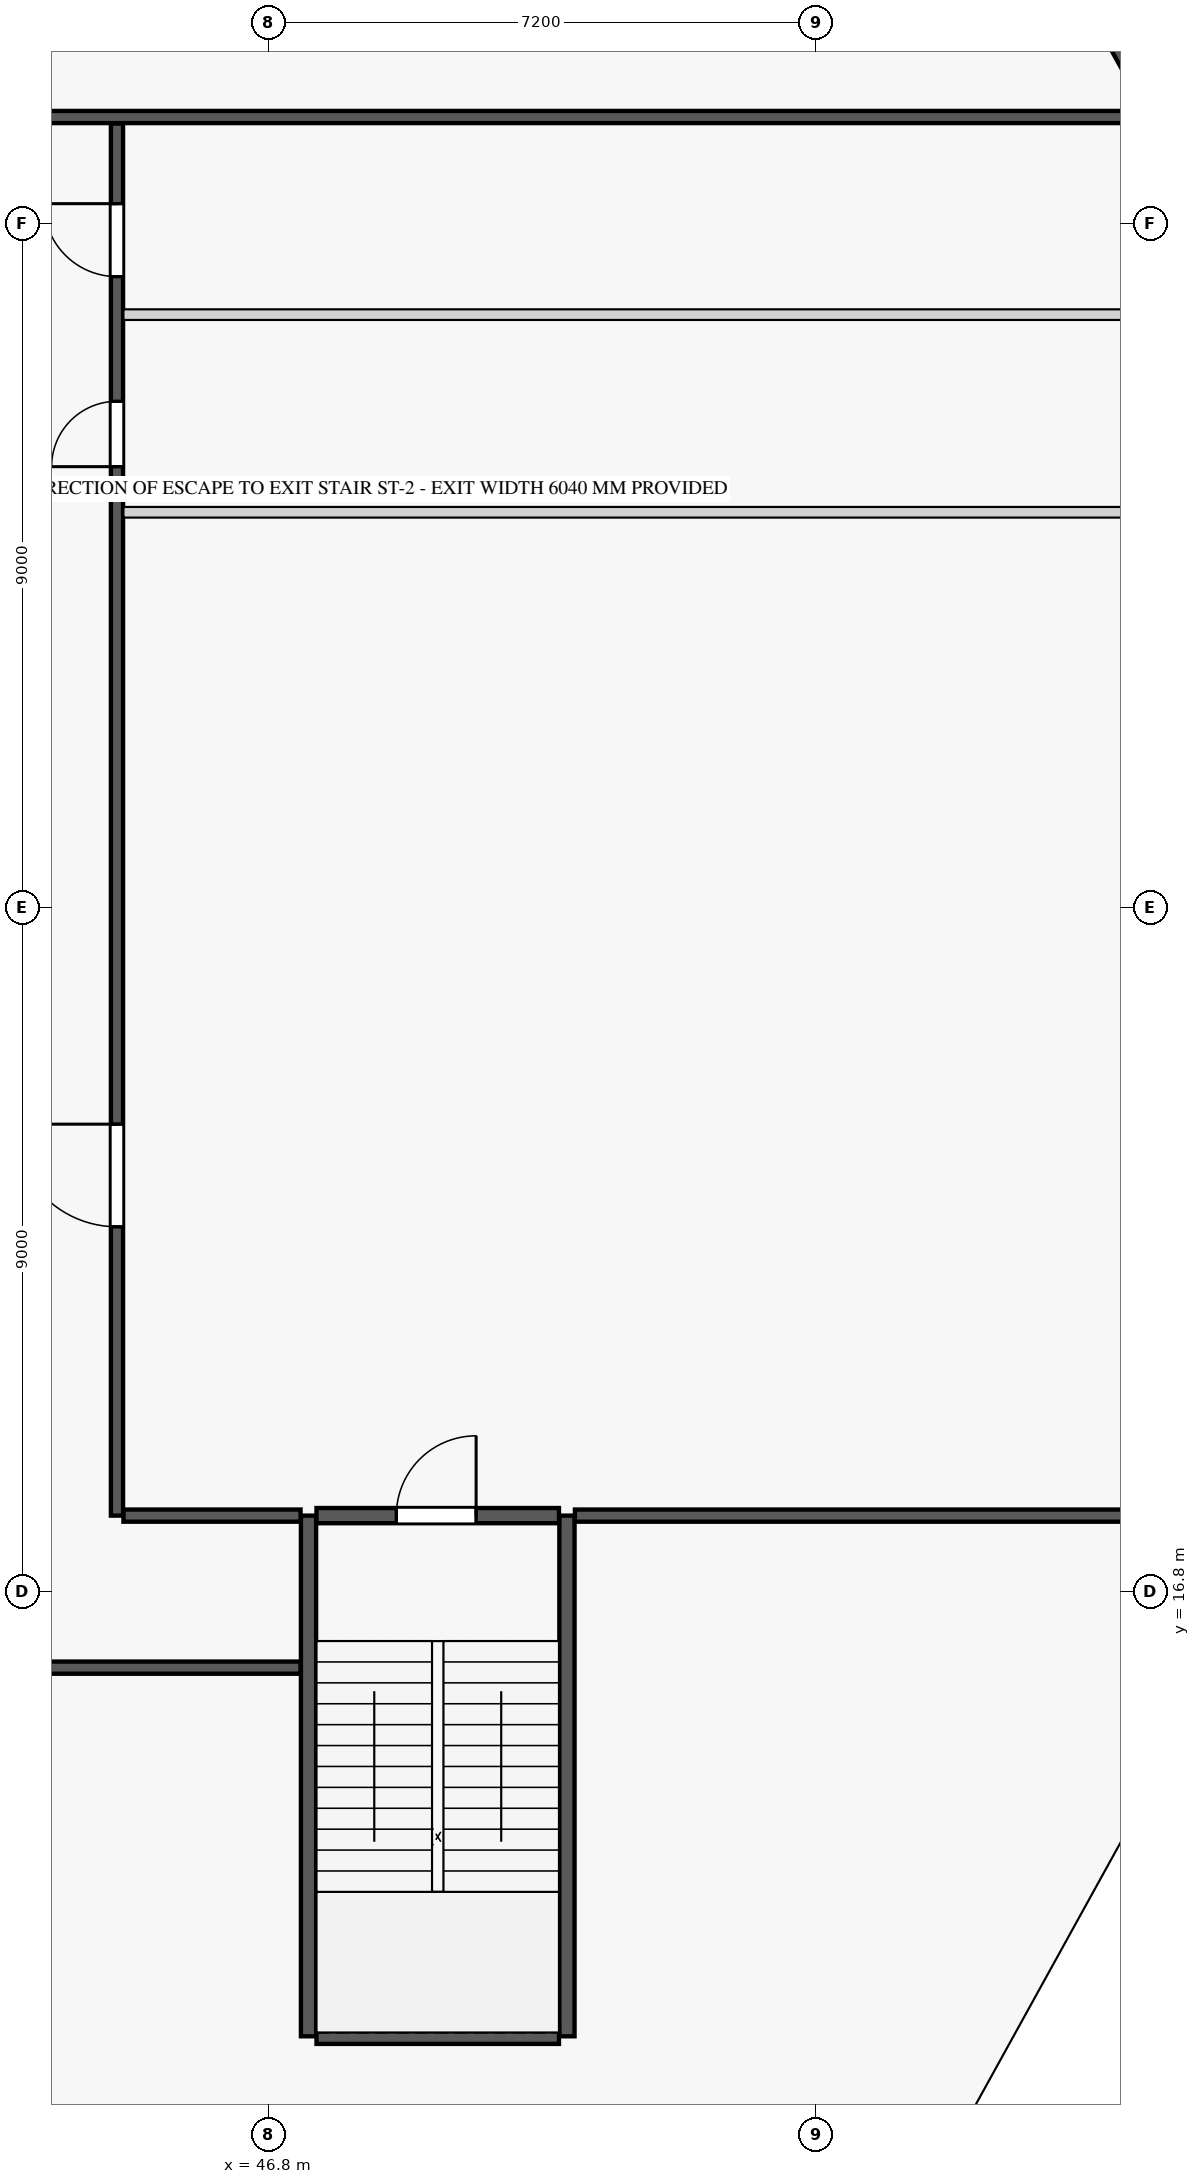
"""IFC4 building model, lengths in metres.
Left out: names, types, materials, properties, quantities, classifications, styles, units other than length and angle.
Written with IfcOpenShell. Run it as: python <this file> out.ifc"""

import sys

from ifc_helpers import new_model, si_unit, direction, frame, frame_2d, origin, place, context, subcontext, project, spatial, rectangle, extrude, element, fill, save


model = new_model("IFC4")
c1 = context("Model", 3, precision=1e-05, world=origin(), true_north=direction((0.0, 1.0)))
c2 = subcontext(c1, "Body", "Model", "MODEL_VIEW")
j1 = project(units=[si_unit("LENGTHUNIT", "METRE"), si_unit("PLANEANGLEUNIT", "RADIAN")], contexts=[c1])
p1 = place(None, origin())
s1 = spatial("IfcSite", under=j1, at=p1, CompositionType="ELEMENT")
p2 = place(p1, origin())
s2 = spatial("IfcBuilding", under=s1, at=p2, CompositionType="ELEMENT")
p3 = place(p2, frame((0.0, 0.0, 10.5)))
s3 = spatial("IfcBuildingStorey", under=s2, at=p3, CompositionType="ELEMENT", Elevation=10.5)
for number, where, z_axis, x_axis in (
    (1, (47.32, 10.95, 0.0), (0.0, 0.0, 1.0), (0.0, 1.0, 0.0)),
    (2, (50.72, 10.95, 0.0), (0.0, 0.0, 1.0), (0.0, 1.0, 0.0)),
):
    element("IfcWall", number, at=place(p3, frame(where, z_axis=z_axis, x_axis=x_axis)), inside=s3, PredefinedType="SHEAR", context=c2, shape_type="SweptSolid", body=[
        extrude(rectangle(XDim=6.85, YDim=0.2, at=frame_2d((3.425, 0.0))), origin(), (0.0, 0.0, 1.0), 4.5),
    ])
p4 = place(p3, frame((47.425, 10.95, 0.0), z_axis=(0.0, 0.0, 1.0), x_axis=(1.0, 0.0, 0.0)))
e3 = element("IfcWall", 3, at=p4, inside=s3, PredefinedType="PLUMBINGWALL", context=c2, shape_type="SweptSolid", body=[
    extrude(rectangle(XDim=3.19, YDim=0.2, at=frame_2d((1.595, 0.0))), origin(), (0.0, 0.0, 1.0), 4.25),
])
p5 = place(p3, frame((47.425, 17.8, 0.0), z_axis=(0.0, 0.0, 1.0), x_axis=(1.0, 0.0, 0.0)))
e4 = element("IfcWall", 4, at=p5, inside=s3, PredefinedType="PLUMBINGWALL", context=c2, shape_type="SweptSolid", body=[
    extrude(rectangle(XDim=3.19, YDim=0.2, at=frame_2d((1.595, 0.0))), origin(), (0.0, 0.0, 1.0), 4.25),
])
p6 = place(p5, frame((1.05, 0.0, 0.0)))
e5 = element("IfcOpeningElement", 5, at=p6, cuts=e4, PredefinedType="OPENING", context=c2, shape_type="SweptSolid", body=[
    extrude(rectangle(XDim=1.05, YDim=2.15, at=frame_2d((0.525, 1.075))), frame((0.0, 0.11, 0.0), z_axis=(0.0, -1.0, 0.0), x_axis=(1.0, 0.0, 0.0)), (0.0, 0.0, 1.0), 0.22),
])
p7 = place(p3, frame((17.625, 15.8, 0.0), z_axis=(0.0, 0.0, 1.0), x_axis=(1.0, 0.0, 0.0)))
e6 = element("IfcWall", 6, at=p7, inside=s3, PredefinedType="PARTITIONING", context=c2, shape_type="SweptSolid", body=[
    extrude(rectangle(XDim=29.59, YDim=0.16, at=frame_2d((14.795, 0.0))), origin(), (0.0, 0.0, 1.0), 4.25),
])
p8 = place(p7, frame((3.5, 0.0, 0.0)))
e7 = element("IfcOpeningElement", 7, at=p8, cuts=e6, PredefinedType="OPENING", context=c2, shape_type="SweptSolid", body=[
    extrude(rectangle(XDim=1.35, YDim=2.35, at=frame_2d((0.675, 1.175))), frame((0.0, 0.09, 0.0), z_axis=(0.0, -1.0, 0.0), x_axis=(1.0, 0.0, 0.0)), (0.0, 0.0, 1.0), 0.18),
])
p9 = place(p7, frame((24.5, 0.0, 0.0)))
e8 = element("IfcOpeningElement", 8, at=p9, cuts=e6, PredefinedType="OPENING", context=c2, shape_type="SweptSolid", body=[
    extrude(rectangle(XDim=1.35, YDim=2.35, at=frame_2d((0.675, 1.175))), frame((0.0, 0.09, 0.0), z_axis=(0.0, -1.0, 0.0), x_axis=(1.0, 0.0, 0.0)), (0.0, 0.0, 1.0), 0.18),
])
p10 = place(p3, frame((44.885, 17.8, 0.0), z_axis=(0.0, 0.0, 1.0), x_axis=(1.0, 0.0, 0.0)))
e9 = element("IfcWall", 9, at=p10, inside=s3, PredefinedType="PARTITIONING", context=c2, shape_type="SweptSolid", body=[
    extrude(rectangle(XDim=2.33, YDim=0.16, at=frame_2d((1.165, 0.0))), origin(), (0.0, 0.0, 1.0), 4.25),
])
p11 = place(p3, frame((50.825, 17.8, 0.0), z_axis=(0.0, 0.0, 1.0), x_axis=(1.0, 0.0, 0.0)))
e10 = element("IfcWall", 10, at=p11, inside=s3, PredefinedType="PARTITIONING", context=c2, shape_type="SweptSolid", body=[
    extrude(rectangle(XDim=8.955, YDim=0.16, at=frame_2d((4.478, 0.0))), origin(), (0.0, 0.0, 1.0), 4.25),
])
p12 = place(p3, frame((44.8, 17.8, 0.0), z_axis=(0.0, 0.0, 1.0), x_axis=(0.0, 1.0, 0.0)))
e11 = element("IfcWall", 11, at=p12, inside=s3, PredefinedType="PARTITIONING", context=c2, shape_type="SweptSolid", body=[
    extrude(rectangle(XDim=18.315, YDim=0.16, at=frame_2d((9.157, 0.0))), origin(), (0.0, 0.0, 1.0), 4.25),
])
p13 = place(p12, frame((3.8, 0.0, 0.0)))
e12 = element("IfcOpeningElement", 12, at=p13, cuts=e11, PredefinedType="OPENING", context=c2, shape_type="SweptSolid", body=[
    extrude(rectangle(XDim=1.35, YDim=2.35, at=frame_2d((0.675, 1.175))), frame((0.0, 0.09, 0.0), z_axis=(0.0, -1.0, 0.0), x_axis=(1.0, 0.0, 0.0)), (0.0, 0.0, 1.0), 0.18),
])
p14 = place(p12, frame((13.8, 0.0, 0.0)))
e13 = element("IfcOpeningElement", 13, at=p14, cuts=e11, PredefinedType="OPENING", context=c2, shape_type="SweptSolid", body=[
    extrude(rectangle(XDim=0.86, YDim=2.1, at=frame_2d((0.43, 1.05))), frame((0.0, 0.09, 0.0), z_axis=(0.0, -1.0, 0.0), x_axis=(1.0, 0.0, 0.0)), (0.0, 0.0, 1.0), 0.18),
])
p15 = place(p12, frame((16.3, 0.0, 0.0)))
e14 = element("IfcOpeningElement", 14, at=p15, cuts=e11, PredefinedType="OPENING", context=c2, shape_type="SweptSolid", body=[
    extrude(rectangle(XDim=0.96, YDim=2.15, at=frame_2d((0.48, 1.075))), frame((0.0, 0.09, 0.0), z_axis=(0.0, -1.0, 0.0), x_axis=(1.0, 0.0, 0.0)), (0.0, 0.0, 1.0), 0.18),
])
p16 = place(p3, frame((6.346, 36.2, 0.0), z_axis=(0.0, 0.0, 1.0), x_axis=(1.0, 0.0, 0.0)))
e15 = element("IfcWall", 15, at=p16, inside=s3, PredefinedType="PARTITIONING", context=c2, shape_type="SweptSolid", body=[
    extrude(rectangle(XDim=52.108, YDim=0.16, at=frame_2d((26.054, 0.0))), origin(), (0.0, 0.0, 1.0), 4.25),
])
p17 = place(p16, frame((6.5, 0.0, 0.0)))
e16 = element("IfcOpeningElement", 16, at=p17, cuts=e15, PredefinedType="OPENING", context=c2, shape_type="SweptSolid", body=[
    extrude(rectangle(XDim=1.35, YDim=2.35, at=frame_2d((0.675, 1.175))), frame((0.0, 0.09, 0.0), z_axis=(0.0, -1.0, 0.0), x_axis=(1.0, 0.0, 0.0)), (0.0, 0.0, 1.0), 0.18),
])
p18 = place(p16, frame((26.5, 0.0, 0.0)))
e17 = element("IfcOpeningElement", 17, at=p18, cuts=e15, PredefinedType="OPENING", context=c2, shape_type="SweptSolid", body=[
    extrude(rectangle(XDim=1.35, YDim=2.35, at=frame_2d((0.675, 1.175))), frame((0.0, 0.09, 0.0), z_axis=(0.0, -1.0, 0.0), x_axis=(1.0, 0.0, 0.0)), (0.0, 0.0, 1.0), 0.18),
])
p19 = place(p3, frame((44.885, 31.0, 0.0), z_axis=(0.0, 0.0, 1.0), x_axis=(1.0, 0.0, 0.0)))
e18 = element("IfcWall", 18, at=p19, inside=s3, PredefinedType="PLUMBINGWALL", context=c2, shape_type="SweptSolid", body=[
    extrude(rectangle(XDim=16.442, YDim=0.14, at=frame_2d((8.221, 0.0))), origin(), (0.0, 0.0, 1.0), 4.25),
])
p20 = place(p3, frame((44.885, 33.6, 0.0), z_axis=(0.0, 0.0, 1.0), x_axis=(1.0, 0.0, 0.0)))
e19 = element("IfcWall", 19, at=p20, inside=s3, PredefinedType="PLUMBINGWALL", context=c2, shape_type="SweptSolid", body=[
    extrude(rectangle(XDim=15.006, YDim=0.14, at=frame_2d((7.503, 0.0))), origin(), (0.0, 0.0, 1.0), 4.25),
])
p21 = place(p3, frame((60.381, 32.889, 0.0), z_axis=(0.0, 0.0, 1.0), x_axis=(-0.483690649574, 0.875239027646, 0.0)))
e20 = element("IfcWall", 20, at=p21, inside=s3, PredefinedType="STANDARD", context=c2, shape_type="SweptSolid", body=[
    extrude(rectangle(XDim=13.015, YDim=0.32, at=frame_2d((6.507, 0.0))), origin(), (0.0, 0.0, 1.0), 4.25),
])
p22 = place(p21, frame((1.439, 0.0, 0.75)))
e21 = element("IfcOpeningElement", 21, at=p22, cuts=e20, PredefinedType="OPENING", context=c2, shape_type="SweptSolid", body=[
    extrude(rectangle(XDim=1.8, YDim=2.4, at=frame_2d((0.9, 1.2))), frame((0.0, 0.17, 0.0), z_axis=(0.0, -1.0, 0.0), x_axis=(1.0, 0.0, 0.0)), (0.0, 0.0, 1.0), 0.34),
])
p23 = place(p21, frame((7.943, 0.0, 0.75)))
e22 = element("IfcOpeningElement", 22, at=p23, cuts=e20, PredefinedType="OPENING", context=c2, shape_type="SweptSolid", body=[
    extrude(rectangle(XDim=1.1, YDim=2.0, at=frame_2d((0.55, 1.0))), frame((0.0, 0.17, 0.0), z_axis=(0.0, -1.0, 0.0), x_axis=(1.0, 0.0, 0.0)), (0.0, 0.0, 1.0), 0.34),
])
p24 = place(p6, origin())
e23 = element("IfcDoor", 23, at=p24, inside=s3, OperationType="SINGLE_SWING_RIGHT", PredefinedType="DOOR", context=c2, shape_type="SweptSolid", body=[
    extrude(rectangle(XDim=1.05, YDim=2.15, at=frame_2d((0.525, 1.075))), frame((0.0, 0.025, 0.0), z_axis=(0.0, -1.0, 0.0), x_axis=(1.0, 0.0, 0.0)), (0.0, 0.0, 1.0), 0.05),
])
fill(e5, e23)
p25 = place(p13, origin())
e24 = element("IfcDoor", 24, at=p25, inside=s3, OperationType="SINGLE_SWING_RIGHT", PredefinedType="DOOR", context=c2, shape_type="SweptSolid", body=[
    extrude(rectangle(XDim=1.35, YDim=2.35, at=frame_2d((0.675, 1.175))), frame((0.0, 0.025, 0.0), z_axis=(0.0, -1.0, 0.0), x_axis=(1.0, 0.0, 0.0)), (0.0, 0.0, 1.0), 0.05),
])
fill(e12, e24)
p26 = place(p14, origin())
e25 = element("IfcDoor", 25, at=p26, inside=s3, OperationType="SINGLE_SWING_LEFT", PredefinedType="DOOR", context=c2, shape_type="SweptSolid", body=[
    extrude(rectangle(XDim=0.86, YDim=2.1, at=frame_2d((0.43, 1.05))), frame((0.0, 0.025, 0.0), z_axis=(0.0, -1.0, 0.0), x_axis=(1.0, 0.0, 0.0)), (0.0, 0.0, 1.0), 0.05),
])
fill(e13, e25)
p27 = place(p15, origin())
e26 = element("IfcDoor", 26, at=p27, inside=s3, OperationType="SINGLE_SWING_RIGHT", PredefinedType="DOOR", context=c2, shape_type="SweptSolid", body=[
    extrude(rectangle(XDim=0.96, YDim=2.15, at=frame_2d((0.48, 1.075))), frame((0.0, 0.025, 0.0), z_axis=(0.0, -1.0, 0.0), x_axis=(1.0, 0.0, 0.0)), (0.0, 0.0, 1.0), 0.05),
])
fill(e14, e26)
save(model, sys.argv[1])
